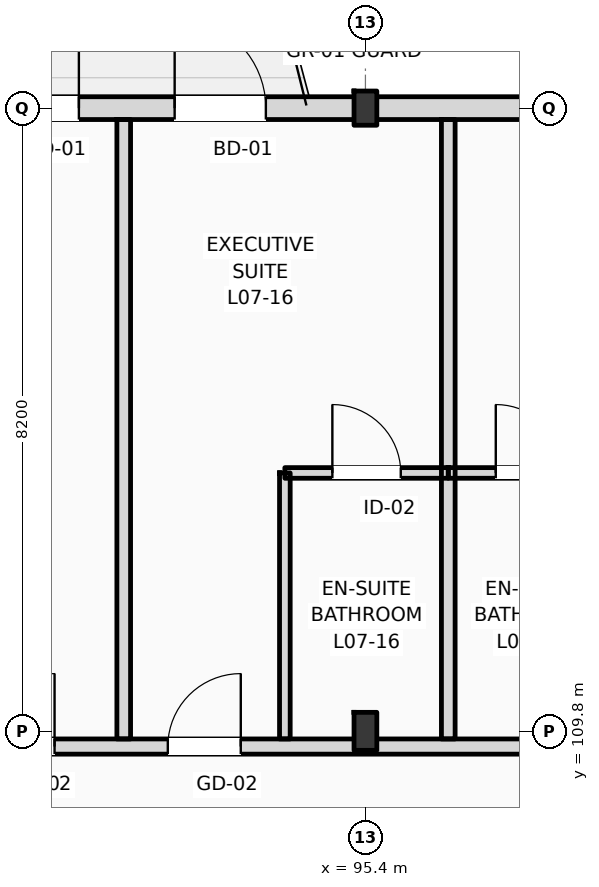
"""IFC4 building model, lengths in metres.
Left out: names, types, materials, properties, quantities, classifications, styles, units other than length and angle.
Written with IfcOpenShell. Run it as: python <this file> out.ifc"""

import sys

from ifc_helpers import new_model, si_unit, direction, frame, frame_2d, origin, origin_2d, place, context, subcontext, project, spatial, rectangle, i_section, extrude, element, fill, save


model = new_model("IFC4")
c1 = context("Model", 3, precision=1e-05, world=origin(), true_north=direction((0.0, 1.0)))
c2 = subcontext(c1, "Body", "Model", "MODEL_VIEW")
j1 = project(units=[si_unit("LENGTHUNIT", "METRE"), si_unit("PLANEANGLEUNIT", "RADIAN")], contexts=[c1])
p1 = place(None, origin())
s1 = spatial("IfcSite", under=j1, at=p1, CompositionType="ELEMENT")
p2 = place(p1, origin())
s2 = spatial("IfcBuilding", under=s1, at=p2, CompositionType="ELEMENT")
p3 = place(p2, frame((0.0, 0.0, 31.8)))
s3 = spatial("IfcBuildingStorey", under=s2, at=p3, CompositionType="ELEMENT", Elevation=31.8)
p4 = place(p3, frame((95.4, 109.8, 0.0), z_axis=(0.0, 0.0, 1.0), x_axis=(1.0, 0.0, 0.0)))
e1 = element("IfcColumn", 1, at=p4, inside=s3, PredefinedType="COLUMN", context=c2, shape_type="SweptSolid", body=[
    extrude(i_section(OverallWidth=0.3, OverallDepth=0.5, WebThickness=0.014, FlangeThickness=0.028, FilletRadius=0.027, at=origin_2d()), origin(), (0.0, 0.0, 1.0), 3.6),
])
p5 = place(p3, frame((95.4, 118.0, 0.0), z_axis=(0.0, 0.0, 1.0), x_axis=(1.0, 0.0, 0.0)))
e2 = element("IfcColumn", 2, at=p5, inside=s3, PredefinedType="COLUMN", context=c2, shape_type="SweptSolid", body=[
    extrude(i_section(OverallWidth=0.3, OverallDepth=0.45, WebThickness=0.014, FlangeThickness=0.026, FilletRadius=0.027, at=origin_2d()), origin(), (0.0, 0.0, 1.0), 3.6),
])
p6 = place(p3, frame((22.5, 118.0, 0.0), z_axis=(0.0, 0.0, 1.0), x_axis=(1.0, 0.0, 0.0)))
e3 = element("IfcWall", 3, at=p6, inside=s3, PredefinedType="STANDARD", context=c2, shape_type="SweptSolid", body=[
    extrude(rectangle(XDim=97.5, YDim=0.3, at=frame_2d((48.75, 0.0))), origin(), (0.0, 0.0, 1.0), 2.72),
])
p7 = place(p6, frame((3.61, 0.0, 0.9)))
e4 = element("IfcOpeningElement", 4, at=p7, cuts=e3, PredefinedType="OPENING", context=c2, shape_type="SweptSolid", body=[
    extrude(rectangle(XDim=1.1, YDim=1.64, at=frame_2d((0.55, 0.82))), frame((0.0, 0.16, 0.0), z_axis=(0.0, -1.0, 0.0), x_axis=(1.0, 0.0, 0.0)), (0.0, 0.0, 1.0), 0.32),
])
p8 = place(p6, frame((6.855, 0.0, 0.0)))
e5 = element("IfcOpeningElement", 5, at=p8, cuts=e3, PredefinedType="OPENING", context=c2, shape_type="SweptSolid", body=[
    extrude(rectangle(XDim=1.2, YDim=2.25, at=frame_2d((0.6, 1.125))), frame((0.0, 0.16, 0.0), z_axis=(0.0, -1.0, 0.0), x_axis=(1.0, 0.0, 0.0)), (0.0, 0.0, 1.0), 0.32),
])
p9 = place(p6, frame((11.405, 0.0, 0.9)))
e6 = element("IfcOpeningElement", 6, at=p9, cuts=e3, PredefinedType="OPENING", context=c2, shape_type="SweptSolid", body=[
    extrude(rectangle(XDim=2.1, YDim=1.64, at=frame_2d((1.05, 0.82))), frame((0.0, 0.16, 0.0), z_axis=(0.0, -1.0, 0.0), x_axis=(1.0, 0.0, 0.0)), (0.0, 0.0, 1.0), 0.32),
])
p10 = place(p6, frame((15.13, 0.0, 0.9)))
e7 = element("IfcOpeningElement", 7, at=p10, cuts=e3, PredefinedType="OPENING", context=c2, shape_type="SweptSolid", body=[
    extrude(rectangle(XDim=2.25, YDim=1.64, at=frame_2d((1.125, 0.82))), frame((0.0, 0.16, 0.0), z_axis=(0.0, -1.0, 0.0), x_axis=(1.0, 0.0, 0.0)), (0.0, 0.0, 1.0), 0.32),
])
p11 = place(p6, frame((21.53, 0.0, 0.0)))
e8 = element("IfcOpeningElement", 8, at=p11, cuts=e3, PredefinedType="OPENING", context=c2, shape_type="SweptSolid", body=[
    extrude(rectangle(XDim=1.2, YDim=2.25, at=frame_2d((0.6, 1.125))), frame((0.0, 0.16, 0.0), z_axis=(0.0, -1.0, 0.0), x_axis=(1.0, 0.0, 0.0)), (0.0, 0.0, 1.0), 0.32),
])
p12 = place(p6, frame((24.18, 0.0, 0.9)))
e9 = element("IfcOpeningElement", 9, at=p12, cuts=e3, PredefinedType="OPENING", context=c2, shape_type="SweptSolid", body=[
    extrude(rectangle(XDim=1.1, YDim=1.64, at=frame_2d((0.55, 0.82))), frame((0.0, 0.16, 0.0), z_axis=(0.0, -1.0, 0.0), x_axis=(1.0, 0.0, 0.0)), (0.0, 0.0, 1.0), 0.32),
])
p13 = place(p6, frame((29.105, 0.0, 0.9)))
e10 = element("IfcOpeningElement", 10, at=p13, cuts=e3, PredefinedType="OPENING", context=c2, shape_type="SweptSolid", body=[
    extrude(rectangle(XDim=2.7, YDim=1.64, at=frame_2d((1.35, 0.82))), frame((0.0, 0.16, 0.0), z_axis=(0.0, -1.0, 0.0), x_axis=(1.0, 0.0, 0.0)), (0.0, 0.0, 1.0), 0.32),
])
p14 = place(p6, frame((34.83, 0.0, 0.9)))
e11 = element("IfcOpeningElement", 11, at=p14, cuts=e3, PredefinedType="OPENING", context=c2, shape_type="SweptSolid", body=[
    extrude(rectangle(XDim=1.8, YDim=1.64, at=frame_2d((0.9, 0.82))), frame((0.0, 0.16, 0.0), z_axis=(0.0, -1.0, 0.0), x_axis=(1.0, 0.0, 0.0)), (0.0, 0.0, 1.0), 0.32),
])
p15 = place(p6, frame((38.525, 0.0, 0.0)))
e12 = element("IfcOpeningElement", 12, at=p15, cuts=e3, PredefinedType="OPENING", context=c2, shape_type="SweptSolid", body=[
    extrude(rectangle(XDim=1.2, YDim=2.25, at=frame_2d((0.6, 1.125))), frame((0.0, 0.16, 0.0), z_axis=(0.0, -1.0, 0.0), x_axis=(1.0, 0.0, 0.0)), (0.0, 0.0, 1.0), 0.32),
])
p16 = place(p6, frame((42.73, 0.0, 0.9)))
e13 = element("IfcOpeningElement", 13, at=p16, cuts=e3, PredefinedType="OPENING", context=c2, shape_type="SweptSolid", body=[
    extrude(rectangle(XDim=3.05, YDim=1.64, at=frame_2d((1.525, 0.82))), frame((0.0, 0.16, 0.0), z_axis=(0.0, -1.0, 0.0), x_axis=(1.0, 0.0, 0.0)), (0.0, 0.0, 1.0), 0.32),
])
p17 = place(p6, frame((47.155, 0.0, 0.9)))
e14 = element("IfcOpeningElement", 14, at=p17, cuts=e3, PredefinedType="OPENING", context=c2, shape_type="SweptSolid", body=[
    extrude(rectangle(XDim=1.35, YDim=1.64, at=frame_2d((0.675, 0.82))), frame((0.0, 0.16, 0.0), z_axis=(0.0, -1.0, 0.0), x_axis=(1.0, 0.0, 0.0)), (0.0, 0.0, 1.0), 0.32),
])
p18 = place(p6, frame((53.065, 0.0, 0.0)))
e15 = element("IfcOpeningElement", 15, at=p18, cuts=e3, PredefinedType="OPENING", context=c2, shape_type="SweptSolid", body=[
    extrude(rectangle(XDim=1.2, YDim=2.25, at=frame_2d((0.6, 1.125))), frame((0.0, 0.16, 0.0), z_axis=(0.0, -1.0, 0.0), x_axis=(1.0, 0.0, 0.0)), (0.0, 0.0, 1.0), 0.32),
])
p19 = place(p6, frame((58.2, 0.0, 0.9)))
e16 = element("IfcOpeningElement", 16, at=p19, cuts=e3, PredefinedType="OPENING", context=c2, shape_type="SweptSolid", body=[
    extrude(rectangle(XDim=1.8, YDim=1.64, at=frame_2d((0.9, 0.82))), frame((0.0, 0.16, 0.0), z_axis=(0.0, -1.0, 0.0), x_axis=(1.0, 0.0, 0.0)), (0.0, 0.0, 1.0), 0.32),
])
p20 = place(p6, frame((61.13, 0.0, 0.9)))
e17 = element("IfcOpeningElement", 17, at=p20, cuts=e3, PredefinedType="OPENING", context=c2, shape_type="SweptSolid", body=[
    extrude(rectangle(XDim=3.05, YDim=1.64, at=frame_2d((1.525, 0.82))), frame((0.0, 0.16, 0.0), z_axis=(0.0, -1.0, 0.0), x_axis=(1.0, 0.0, 0.0)), (0.0, 0.0, 1.0), 0.32),
])
p21 = place(p6, frame((67.93, 0.0, 0.0)))
e18 = element("IfcOpeningElement", 18, at=p21, cuts=e3, PredefinedType="OPENING", context=c2, shape_type="SweptSolid", body=[
    extrude(rectangle(XDim=1.2, YDim=2.25, at=frame_2d((0.6, 1.125))), frame((0.0, 0.16, 0.0), z_axis=(0.0, -1.0, 0.0), x_axis=(1.0, 0.0, 0.0)), (0.0, 0.0, 1.0), 0.32),
])
p22 = place(p6, frame((70.39, 0.0, 0.0)))
e19 = element("IfcOpeningElement", 19, at=p22, cuts=e3, PredefinedType="OPENING", context=c2, shape_type="SweptSolid", body=[
    extrude(rectangle(XDim=1.2, YDim=2.25, at=frame_2d((0.6, 1.125))), frame((0.0, 0.16, 0.0), z_axis=(0.0, -1.0, 0.0), x_axis=(1.0, 0.0, 0.0)), (0.0, 0.0, 1.0), 0.32),
])
p23 = place(p6, frame((75.905, 0.0, 0.9)))
e20 = element("IfcOpeningElement", 20, at=p23, cuts=e3, PredefinedType="OPENING", context=c2, shape_type="SweptSolid", body=[
    extrude(rectangle(XDim=1.1, YDim=1.5, at=frame_2d((0.55, 0.75))), frame((0.0, 0.16, 0.0), z_axis=(0.0, -1.0, 0.0), x_axis=(1.0, 0.0, 0.0)), (0.0, 0.0, 1.0), 0.32),
])
p24 = place(p6, frame((81.63, 0.0, 0.9)))
e21 = element("IfcOpeningElement", 21, at=p24, cuts=e3, PredefinedType="OPENING", context=c2, shape_type="SweptSolid", body=[
    extrude(rectangle(XDim=1.1, YDim=1.6, at=frame_2d((0.55, 0.8))), frame((0.0, 0.16, 0.0), z_axis=(0.0, -1.0, 0.0), x_axis=(1.0, 0.0, 0.0)), (0.0, 0.0, 1.0), 0.32),
])
p25 = place(p6, frame((84.955, 0.0, 0.9)))
e22 = element("IfcOpeningElement", 22, at=p25, cuts=e3, PredefinedType="OPENING", context=c2, shape_type="SweptSolid", body=[
    extrude(rectangle(XDim=1.4, YDim=1.64, at=frame_2d((0.7, 0.82))), frame((0.0, 0.16, 0.0), z_axis=(0.0, -1.0, 0.0), x_axis=(1.0, 0.0, 0.0)), (0.0, 0.0, 1.0), 0.32),
])
p26 = place(p6, frame((90.055, 0.0, 0.9)))
e23 = element("IfcOpeningElement", 23, at=p26, cuts=e3, PredefinedType="OPENING", context=c2, shape_type="SweptSolid", body=[
    extrude(rectangle(XDim=1.6, YDim=1.64, at=frame_2d((0.8, 0.82))), frame((0.0, 0.16, 0.0), z_axis=(0.0, -1.0, 0.0), x_axis=(1.0, 0.0, 0.0)), (0.0, 0.0, 1.0), 0.32),
])
p27 = place(p6, frame((93.87, 0.0, 0.9)))
e24 = element("IfcOpeningElement", 24, at=p27, cuts=e3, PredefinedType="OPENING", context=c2, shape_type="SweptSolid", body=[
    extrude(rectangle(XDim=1.75, YDim=1.64, at=frame_2d((0.875, 0.82))), frame((0.0, 0.16, 0.0), z_axis=(0.0, -1.0, 0.0), x_axis=(1.0, 0.0, 0.0)), (0.0, 0.0, 1.0), 0.32),
])
p28 = place(p3, frame((10.65, 109.6, 0.0), z_axis=(0.0, 0.0, 1.0), x_axis=(1.0, 0.0, 0.0)))
e25 = element("IfcWall", 25, at=p28, inside=s3, PredefinedType="PARTITIONING", context=c2, shape_type="SweptSolid", body=[
    extrude(rectangle(XDim=109.21, YDim=0.2, at=frame_2d((54.605, 0.0))), origin(), (0.0, 0.0, 1.0), 2.72),
])
p29 = place(p28, frame((15.825, 0.0, 0.0)))
e26 = element("IfcOpeningElement", 26, at=p29, cuts=e25, PredefinedType="OPENING", context=c2, shape_type="SweptSolid", body=[
    extrude(rectangle(XDim=1.02, YDim=2.2, at=frame_2d((0.51, 1.1))), frame((0.0, 0.11, 0.0), z_axis=(0.0, -1.0, 0.0), x_axis=(1.0, 0.0, 0.0)), (0.0, 0.0, 1.0), 0.22),
])
p30 = place(p28, frame((19.87, 0.0, 0.0)))
e27 = element("IfcOpeningElement", 27, at=p30, cuts=e25, PredefinedType="OPENING", context=c2, shape_type="SweptSolid", body=[
    extrude(rectangle(XDim=1.02, YDim=2.2, at=frame_2d((0.51, 1.1))), frame((0.0, 0.11, 0.0), z_axis=(0.0, -1.0, 0.0), x_axis=(1.0, 0.0, 0.0)), (0.0, 0.0, 1.0), 0.22),
])
p31 = place(p28, frame((24.47, 0.0, 0.0)))
e28 = element("IfcOpeningElement", 28, at=p31, cuts=e25, PredefinedType="OPENING", context=c2, shape_type="SweptSolid", body=[
    extrude(rectangle(XDim=1.02, YDim=2.2, at=frame_2d((0.51, 1.1))), frame((0.0, 0.11, 0.0), z_axis=(0.0, -1.0, 0.0), x_axis=(1.0, 0.0, 0.0)), (0.0, 0.0, 1.0), 0.22),
])
p32 = place(p28, frame((26.92, 0.0, 0.0)))
e29 = element("IfcOpeningElement", 29, at=p32, cuts=e25, PredefinedType="OPENING", context=c2, shape_type="SweptSolid", body=[
    extrude(rectangle(XDim=1.02, YDim=2.2, at=frame_2d((0.51, 1.1))), frame((0.0, 0.11, 0.0), z_axis=(0.0, -1.0, 0.0), x_axis=(1.0, 0.0, 0.0)), (0.0, 0.0, 1.0), 0.22),
])
p33 = place(p28, frame((33.7, 0.0, 0.0)))
e30 = element("IfcOpeningElement", 30, at=p33, cuts=e25, PredefinedType="OPENING", context=c2, shape_type="SweptSolid", body=[
    extrude(rectangle(XDim=0.96, YDim=2.2, at=frame_2d((0.48, 1.1))), frame((0.0, 0.11, 0.0), z_axis=(0.0, -1.0, 0.0), x_axis=(1.0, 0.0, 0.0)), (0.0, 0.0, 1.0), 0.22),
])
p34 = place(p28, frame((35.9, 0.0, 0.0)))
e31 = element("IfcOpeningElement", 31, at=p34, cuts=e25, PredefinedType="OPENING", context=c2, shape_type="SweptSolid", body=[
    extrude(rectangle(XDim=0.96, YDim=2.2, at=frame_2d((0.48, 1.1))), frame((0.0, 0.11, 0.0), z_axis=(0.0, -1.0, 0.0), x_axis=(1.0, 0.0, 0.0)), (0.0, 0.0, 1.0), 0.22),
])
p35 = place(p28, frame((42.9, 0.0, 0.0)))
e32 = element("IfcOpeningElement", 32, at=p35, cuts=e25, PredefinedType="OPENING", context=c2, shape_type="SweptSolid", body=[
    extrude(rectangle(XDim=0.96, YDim=2.2, at=frame_2d((0.48, 1.1))), frame((0.0, 0.11, 0.0), z_axis=(0.0, -1.0, 0.0), x_axis=(1.0, 0.0, 0.0)), (0.0, 0.0, 1.0), 0.22),
])
p36 = place(p28, frame((47.5, 0.0, 0.0)))
e33 = element("IfcOpeningElement", 33, at=p36, cuts=e25, PredefinedType="OPENING", context=c2, shape_type="SweptSolid", body=[
    extrude(rectangle(XDim=0.96, YDim=2.2, at=frame_2d((0.48, 1.1))), frame((0.0, 0.11, 0.0), z_axis=(0.0, -1.0, 0.0), x_axis=(1.0, 0.0, 0.0)), (0.0, 0.0, 1.0), 0.22),
])
p37 = place(p28, frame((49.95, 0.0, 0.0)))
e34 = element("IfcOpeningElement", 34, at=p37, cuts=e25, PredefinedType="OPENING", context=c2, shape_type="SweptSolid", body=[
    extrude(rectangle(XDim=0.96, YDim=2.2, at=frame_2d((0.48, 1.1))), frame((0.0, 0.11, 0.0), z_axis=(0.0, -1.0, 0.0), x_axis=(1.0, 0.0, 0.0)), (0.0, 0.0, 1.0), 0.22),
])
p38 = place(p28, frame((56.7, 0.0, 0.0)))
e35 = element("IfcOpeningElement", 35, at=p38, cuts=e25, PredefinedType="OPENING", context=c2, shape_type="SweptSolid", body=[
    extrude(rectangle(XDim=0.96, YDim=2.2, at=frame_2d((0.48, 1.1))), frame((0.0, 0.11, 0.0), z_axis=(0.0, -1.0, 0.0), x_axis=(1.0, 0.0, 0.0)), (0.0, 0.0, 1.0), 0.22),
])
p39 = place(p28, frame((59.15, 0.0, 0.0)))
e36 = element("IfcOpeningElement", 36, at=p39, cuts=e25, PredefinedType="OPENING", context=c2, shape_type="SweptSolid", body=[
    extrude(rectangle(XDim=0.96, YDim=2.2, at=frame_2d((0.48, 1.1))), frame((0.0, 0.11, 0.0), z_axis=(0.0, -1.0, 0.0), x_axis=(1.0, 0.0, 0.0)), (0.0, 0.0, 1.0), 0.22),
])
p40 = place(p28, frame((65.9, 0.0, 0.0)))
e37 = element("IfcOpeningElement", 37, at=p40, cuts=e25, PredefinedType="OPENING", context=c2, shape_type="SweptSolid", body=[
    extrude(rectangle(XDim=0.96, YDim=2.2, at=frame_2d((0.48, 1.1))), frame((0.0, 0.11, 0.0), z_axis=(0.0, -1.0, 0.0), x_axis=(1.0, 0.0, 0.0)), (0.0, 0.0, 1.0), 0.22),
])
p41 = place(p28, frame((70.5, 0.0, 0.0)))
e38 = element("IfcOpeningElement", 38, at=p41, cuts=e25, PredefinedType="OPENING", context=c2, shape_type="SweptSolid", body=[
    extrude(rectangle(XDim=0.96, YDim=2.2, at=frame_2d((0.48, 1.1))), frame((0.0, 0.11, 0.0), z_axis=(0.0, -1.0, 0.0), x_axis=(1.0, 0.0, 0.0)), (0.0, 0.0, 1.0), 0.22),
])
p42 = place(p28, frame((72.95, 0.0, 0.0)))
e39 = element("IfcOpeningElement", 39, at=p42, cuts=e25, PredefinedType="OPENING", context=c2, shape_type="SweptSolid", body=[
    extrude(rectangle(XDim=0.96, YDim=2.2, at=frame_2d((0.48, 1.1))), frame((0.0, 0.11, 0.0), z_axis=(0.0, -1.0, 0.0), x_axis=(1.0, 0.0, 0.0)), (0.0, 0.0, 1.0), 0.22),
])
p43 = place(p28, frame((79.7, 0.0, 0.0)))
e40 = element("IfcOpeningElement", 40, at=p43, cuts=e25, PredefinedType="OPENING", context=c2, shape_type="SweptSolid", body=[
    extrude(rectangle(XDim=0.96, YDim=2.2, at=frame_2d((0.48, 1.1))), frame((0.0, 0.11, 0.0), z_axis=(0.0, -1.0, 0.0), x_axis=(1.0, 0.0, 0.0)), (0.0, 0.0, 1.0), 0.22),
])
p44 = place(p28, frame((82.15, 0.0, 0.0)))
e41 = element("IfcOpeningElement", 41, at=p44, cuts=e25, PredefinedType="OPENING", context=c2, shape_type="SweptSolid", body=[
    extrude(rectangle(XDim=0.96, YDim=2.2, at=frame_2d((0.48, 1.1))), frame((0.0, 0.11, 0.0), z_axis=(0.0, -1.0, 0.0), x_axis=(1.0, 0.0, 0.0)), (0.0, 0.0, 1.0), 0.22),
])
p45 = place(p28, frame((88.9, 0.0, 0.0)))
e42 = element("IfcOpeningElement", 42, at=p45, cuts=e25, PredefinedType="OPENING", context=c2, shape_type="SweptSolid", body=[
    extrude(rectangle(XDim=0.96, YDim=2.2, at=frame_2d((0.48, 1.1))), frame((0.0, 0.11, 0.0), z_axis=(0.0, -1.0, 0.0), x_axis=(1.0, 0.0, 0.0)), (0.0, 0.0, 1.0), 0.22),
])
p46 = place(p28, frame((93.75, 0.0, 0.0)))
e43 = element("IfcOpeningElement", 43, at=p46, cuts=e25, PredefinedType="OPENING", context=c2, shape_type="SweptSolid", body=[
    extrude(rectangle(XDim=0.96, YDim=2.2, at=frame_2d((0.48, 1.1))), frame((0.0, 0.11, 0.0), z_axis=(0.0, -1.0, 0.0), x_axis=(1.0, 0.0, 0.0)), (0.0, 0.0, 1.0), 0.22),
])
p47 = place(p28, frame((98.1, 0.0, 0.0)))
e44 = element("IfcOpeningElement", 44, at=p47, cuts=e25, PredefinedType="OPENING", context=c2, shape_type="SweptSolid", body=[
    extrude(rectangle(XDim=0.96, YDim=2.2, at=frame_2d((0.48, 1.1))), frame((0.0, 0.11, 0.0), z_axis=(0.0, -1.0, 0.0), x_axis=(1.0, 0.0, 0.0)), (0.0, 0.0, 1.0), 0.22),
])
p48 = place(p28, frame((102.7, 0.0, 0.0)))
e45 = element("IfcOpeningElement", 45, at=p48, cuts=e25, PredefinedType="OPENING", context=c2, shape_type="SweptSolid", body=[
    extrude(rectangle(XDim=0.96, YDim=2.2, at=frame_2d((0.48, 1.1))), frame((0.0, 0.11, 0.0), z_axis=(0.0, -1.0, 0.0), x_axis=(1.0, 0.0, 0.0)), (0.0, 0.0, 1.0), 0.22),
])
p49 = place(p28, frame((105.04, 0.0, 0.0)))
e46 = element("IfcOpeningElement", 46, at=p49, cuts=e25, PredefinedType="OPENING", context=c2, shape_type="SweptSolid", body=[
    extrude(rectangle(XDim=0.96, YDim=2.2, at=frame_2d((0.48, 1.1))), frame((0.0, 0.11, 0.0), z_axis=(0.0, -1.0, 0.0), x_axis=(1.0, 0.0, 0.0)), (0.0, 0.0, 1.0), 0.22),
])
p50 = place(p28, frame((2.716, 0.0, 0.0)))
e47 = element("IfcOpeningElement", 47, at=p50, cuts=e25, PredefinedType="OPENING", context=c2, shape_type="SweptSolid", body=[
    extrude(rectangle(XDim=1.35, YDim=2.25, at=frame_2d((0.675, 1.125))), frame((0.0, 0.11, 0.0), z_axis=(0.0, -1.0, 0.0), x_axis=(1.0, 0.0, 0.0)), (0.0, 0.0, 1.0), 0.22),
])
p51 = place(p28, frame((6.65, 0.0, 0.0)))
e48 = element("IfcOpeningElement", 48, at=p51, cuts=e25, PredefinedType="OPENING", context=c2, shape_type="SweptSolid", body=[
    extrude(rectangle(XDim=1.35, YDim=2.25, at=frame_2d((0.675, 1.125))), frame((0.0, 0.11, 0.0), z_axis=(0.0, -1.0, 0.0), x_axis=(1.0, 0.0, 0.0)), (0.0, 0.0, 1.0), 0.22),
])
p52 = place(p28, frame((10.583, 0.0, 0.0)))
e49 = element("IfcOpeningElement", 49, at=p52, cuts=e25, PredefinedType="OPENING", context=c2, shape_type="SweptSolid", body=[
    extrude(rectangle(XDim=1.35, YDim=2.25, at=frame_2d((0.675, 1.125))), frame((0.0, 0.11, 0.0), z_axis=(0.0, -1.0, 0.0), x_axis=(1.0, 0.0, 0.0)), (0.0, 0.0, 1.0), 0.22),
])
for number, where, z_axis, x_axis in (
    (50, (92.22, 109.7, 0.0), (0.0, 0.0, 1.0), (0.0, 1.0, 0.0)),
    (51, (96.49, 109.7, 0.0), (0.0, 0.0, 1.0), (0.0, 1.0, 0.0)),
):
    element("IfcWall", number, at=place(p3, frame(where, z_axis=z_axis, x_axis=x_axis)), inside=s3, PredefinedType="PARTITIONING", context=c2, shape_type="SweptSolid", body=[
        extrude(rectangle(XDim=8.15, YDim=0.18, at=frame_2d((4.075, 0.0))), origin(), (0.0, 0.0, 1.0), 3.36),
    ])
p53 = place(p3, frame((94.34, 109.7, 0.0), z_axis=(0.0, 0.0, 1.0), x_axis=(0.0, 1.0, 0.0)))
e52 = element("IfcWall", 52, at=p53, inside=s3, PredefinedType="PARTITIONING", context=c2, shape_type="SweptSolid", body=[
    extrude(rectangle(XDim=3.5, YDim=0.14, at=frame_2d((1.75, 0.0))), origin(), (0.0, 0.0, 1.0), 3.36),
])
p54 = place(p3, frame((94.34, 113.2, 0.0), z_axis=(0.0, 0.0, 1.0), x_axis=(1.0, 0.0, 0.0)))
e53 = element("IfcWall", 53, at=p54, inside=s3, PredefinedType="PARTITIONING", context=c2, shape_type="SweptSolid", body=[
    extrude(rectangle(XDim=2.15, YDim=0.14, at=frame_2d((1.075, 0.0))), origin(), (0.0, 0.0, 1.0), 3.36),
])
p55 = place(p54, frame((0.625, 0.0, 0.0)))
e54 = element("IfcOpeningElement", 54, at=p55, cuts=e53, PredefinedType="OPENING", context=c2, shape_type="SweptSolid", body=[
    extrude(rectangle(XDim=0.9, YDim=2.1, at=frame_2d((0.45, 1.05))), frame((0.0, 0.08, 0.0), z_axis=(0.0, -1.0, 0.0), x_axis=(1.0, 0.0, 0.0)), (0.0, 0.0, 1.0), 0.16),
])
p56 = place(p3, frame((96.49, 113.2, 0.0), z_axis=(0.0, 0.0, 1.0), x_axis=(1.0, 0.0, 0.0)))
e55 = element("IfcWall", 55, at=p56, inside=s3, PredefinedType="PARTITIONING", context=c2, shape_type="SweptSolid", body=[
    extrude(rectangle(XDim=2.15, YDim=0.14, at=frame_2d((1.075, 0.0))), origin(), (0.0, 0.0, 1.0), 3.36),
])
p57 = place(p56, frame((0.625, 0.0, 0.0)))
e56 = element("IfcOpeningElement", 56, at=p57, cuts=e55, PredefinedType="OPENING", context=c2, shape_type="SweptSolid", body=[
    extrude(rectangle(XDim=0.9, YDim=2.1, at=frame_2d((0.45, 1.05))), frame((0.0, 0.08, 0.0), z_axis=(0.0, -1.0, 0.0), x_axis=(1.0, 0.0, 0.0)), (0.0, 0.0, 1.0), 0.16),
])
p58 = place(p21, origin())
e57 = element("IfcDoor", 57, at=p58, inside=s3, OperationType="SINGLE_SWING_RIGHT", PredefinedType="DOOR", context=c2, shape_type="SweptSolid", body=[
    extrude(rectangle(XDim=1.2, YDim=2.25, at=frame_2d((0.6, 1.125))), frame((0.0, 0.025, 0.0), z_axis=(0.0, -1.0, 0.0), x_axis=(1.0, 0.0, 0.0)), (0.0, 0.0, 1.0), 0.05),
])
fill(e18, e57)
p59 = place(p22, origin())
e58 = element("IfcDoor", 58, at=p59, inside=s3, OperationType="SINGLE_SWING_LEFT", PredefinedType="DOOR", context=c2, shape_type="SweptSolid", body=[
    extrude(rectangle(XDim=1.2, YDim=2.25, at=frame_2d((0.6, 1.125))), frame((0.0, 0.025, 0.0), z_axis=(0.0, -1.0, 0.0), x_axis=(1.0, 0.0, 0.0)), (0.0, 0.0, 1.0), 0.05),
])
fill(e19, e58)
p60 = place(p43, origin())
e59 = element("IfcDoor", 59, at=p60, inside=s3, OperationType="SINGLE_SWING_RIGHT", PredefinedType="DOOR", context=c2, shape_type="SweptSolid", body=[
    extrude(rectangle(XDim=0.96, YDim=2.2, at=frame_2d((0.48, 1.1))), frame((0.0, 0.025, 0.0), z_axis=(0.0, -1.0, 0.0), x_axis=(1.0, 0.0, 0.0)), (0.0, 0.0, 1.0), 0.05),
])
fill(e40, e59)
p61 = place(p44, origin())
e60 = element("IfcDoor", 60, at=p61, inside=s3, OperationType="SINGLE_SWING_RIGHT", PredefinedType="DOOR", context=c2, shape_type="SweptSolid", body=[
    extrude(rectangle(XDim=0.96, YDim=2.2, at=frame_2d((0.48, 1.1))), frame((0.0, 0.025, 0.0), z_axis=(0.0, -1.0, 0.0), x_axis=(1.0, 0.0, 0.0)), (0.0, 0.0, 1.0), 0.05),
])
fill(e41, e60)
p62 = place(p55, origin())
e61 = element("IfcDoor", 61, at=p62, inside=s3, OperationType="SINGLE_SWING_LEFT", PredefinedType="DOOR", context=c2, shape_type="SweptSolid", body=[
    extrude(rectangle(XDim=0.9, YDim=2.1, at=frame_2d((0.45, 1.05))), frame((0.0, 0.025, 0.0), z_axis=(0.0, -1.0, 0.0), x_axis=(1.0, 0.0, 0.0)), (0.0, 0.0, 1.0), 0.05),
])
fill(e54, e61)
p63 = place(p57, origin())
e62 = element("IfcDoor", 62, at=p63, inside=s3, OperationType="SINGLE_SWING_LEFT", PredefinedType="DOOR", context=c2, shape_type="SweptSolid", body=[
    extrude(rectangle(XDim=0.9, YDim=2.1, at=frame_2d((0.45, 1.05))), frame((0.0, 0.025, 0.0), z_axis=(0.0, -1.0, 0.0), x_axis=(1.0, 0.0, 0.0)), (0.0, 0.0, 1.0), 0.05),
])
fill(e56, e62)
save(model, sys.argv[1])
